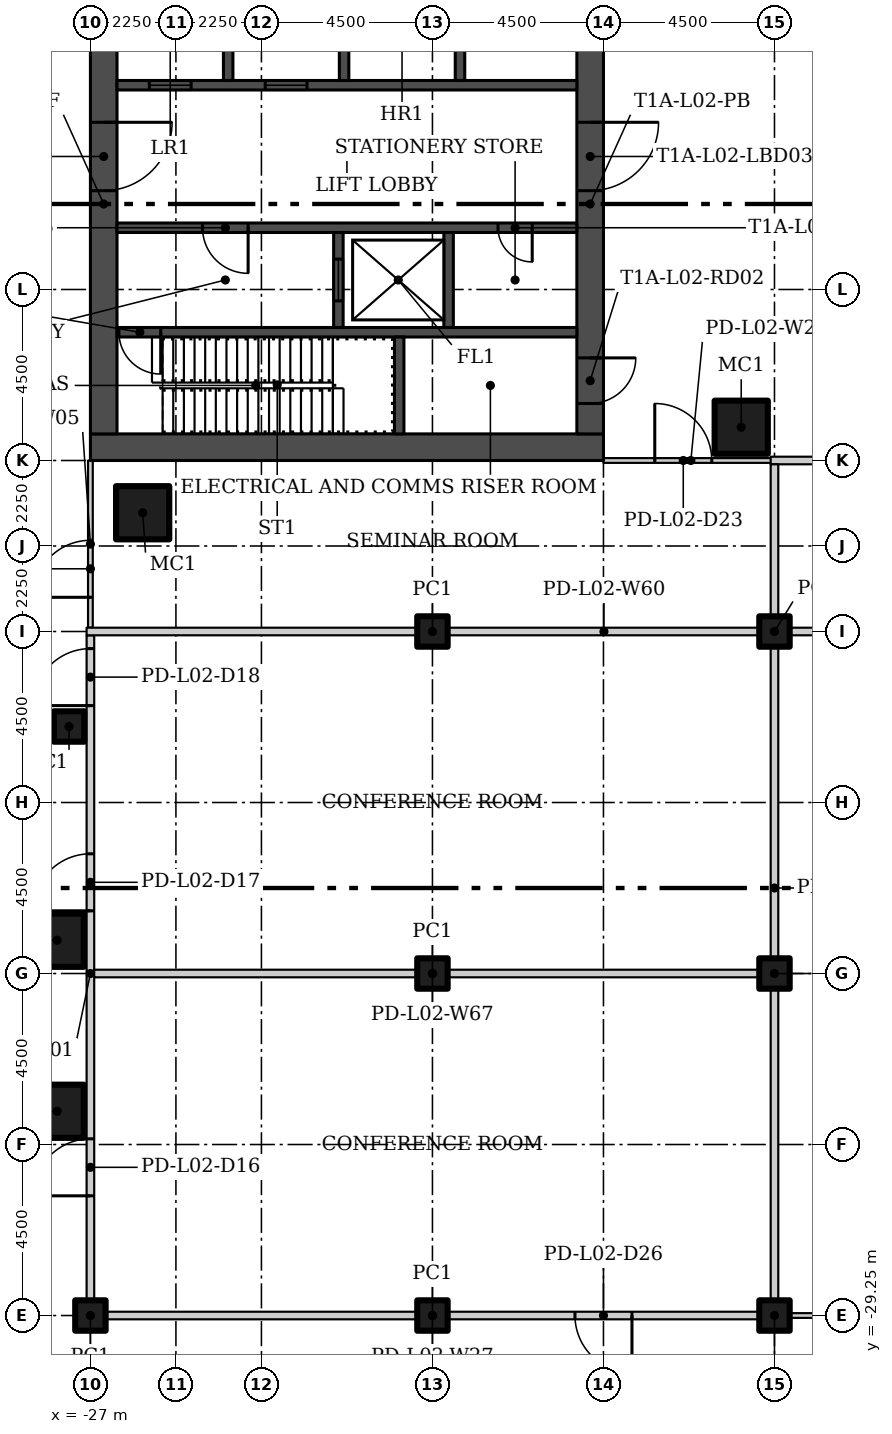
"""IFC4 building model, lengths in metres.
Left out: names, types, materials, properties, quantities, classifications, styles, units other than length and angle.
Written with IfcOpenShell. Run it as: python <this file> out.ifc"""

import sys

from ifc_helpers import new_model, si_unit, direction, frame, frame_2d, origin, origin_2d, place, context, subcontext, project, spatial, rectangle, hollow_rectangle, extrude, element, fill, save


model = new_model("IFC4")
c1 = context("Model", 3, precision=1e-05, world=origin(), true_north=direction((0.0, 1.0)))
c2 = subcontext(c1, "Body", "Model", "MODEL_VIEW")
j1 = project(units=[si_unit("LENGTHUNIT", "METRE"), si_unit("PLANEANGLEUNIT", "RADIAN")], contexts=[c1])
p1 = place(None, origin())
s1 = spatial("IfcSite", under=j1, at=p1, CompositionType="ELEMENT")
p2 = place(p1, origin())
s2 = spatial("IfcBuilding", under=s1, at=p2, CompositionType="ELEMENT")
p3 = place(p2, frame((0.0, 0.0, 12.5)))
s3 = spatial("IfcBuildingStorey", under=s2, at=p3, CompositionType="ELEMENT", Elevation=12.5)
for number, where in (
    (1, (-25.625, -8.125, 0.0)),
    (2, (-9.875, -5.875, 0.0)),
):
    element("IfcColumn", number, at=place(p3, frame(where)), inside=s3, PredefinedType="COLUMN", context=c2, shape_type="SweptSolid", body=[
        extrude(hollow_rectangle(XDim=1.4, YDim=1.4, WallThickness=0.06, at=origin_2d()), origin(), (0.0, 0.0, 1.0), 5.6),
    ])
p4 = place(p3, frame((-27.562, -13.75, 0.0)))
e3 = element("IfcColumn", 3, at=p4, inside=s3, PredefinedType="COLUMN", context=c2, shape_type="SweptSolid", body=[
    extrude(hollow_rectangle(XDim=0.8, YDim=0.8, WallThickness=0.03, at=origin_2d()), origin(), (0.0, 0.0, 1.0), 5.6),
])
for number, where in (
    (4, (-27.875, -19.375, 0.0)),
    (5, (-27.875, -23.875, 0.0)),
):
    element("IfcColumn", number, at=place(p3, frame(where)), inside=s3, PredefinedType="COLUMN", context=c2, shape_type="SweptSolid", body=[
        extrude(hollow_rectangle(XDim=1.4, YDim=1.4, WallThickness=0.06, at=origin_2d()), origin(), (0.0, 0.0, 1.0), 5.6),
    ])
for number, where in (
    (6, (-27.0, -29.25, 0.0)),
    (7, (-18.0, -29.25, 0.0)),
    (8, (-18.0, -20.25, 0.0)),
    (9, (-18.0, -11.25, 0.0)),
    (10, (-9.0, -29.25, 0.0)),
    (11, (-9.0, -20.25, 0.0)),
    (12, (-9.0, -11.25, 0.0)),
):
    element("IfcColumn", number, at=place(p3, frame(where)), inside=s3, PredefinedType="COLUMN", context=c2, shape_type="SweptSolid", body=[
        extrude(hollow_rectangle(XDim=0.8, YDim=0.8, WallThickness=0.03, at=origin_2d()), origin(), (0.0, 0.0, 1.0), 5.6),
    ])
p5 = place(p3, frame((-27.0, -29.15, 0.0), z_axis=(0.0, 0.0, 1.0), x_axis=(0.0, 1.0, 0.0)))
e13 = element("IfcWall", 13, at=p5, inside=s3, PredefinedType="PARTITIONING", context=c2, shape_type="SweptSolid", body=[
    extrude(rectangle(XDim=17.8, YDim=0.2, at=frame_2d((8.9, 0.0))), origin(), (0.0, 0.0, 1.0), 5.6),
])
p6 = place(p5, frame((3.05, 0.0, 0.0)))
e14 = element("IfcOpeningElement", 14, at=p6, cuts=e13, PredefinedType="OPENING", context=c2, shape_type="SweptSolid", body=[
    extrude(rectangle(XDim=1.5, YDim=2.1, at=frame_2d((0.75, 1.05))), frame((0.0, 0.11, 0.0), z_axis=(0.0, -1.0, 0.0), x_axis=(1.0, 0.0, 0.0)), (0.0, 0.0, 1.0), 0.22),
])
p7 = place(p5, frame((10.55, 0.0, 0.0)))
e15 = element("IfcOpeningElement", 15, at=p7, cuts=e13, PredefinedType="OPENING", context=c2, shape_type="SweptSolid", body=[
    extrude(rectangle(XDim=1.5, YDim=2.1, at=frame_2d((0.75, 1.05))), frame((0.0, 0.11, 0.0), z_axis=(0.0, -1.0, 0.0), x_axis=(1.0, 0.0, 0.0)), (0.0, 0.0, 1.0), 0.22),
])
p8 = place(p5, frame((15.95, 0.0, 0.0)))
e16 = element("IfcOpeningElement", 16, at=p8, cuts=e13, PredefinedType="OPENING", context=c2, shape_type="SweptSolid", body=[
    extrude(rectangle(XDim=1.5, YDim=2.1, at=frame_2d((0.75, 1.05))), frame((0.0, 0.11, 0.0), z_axis=(0.0, -1.0, 0.0), x_axis=(1.0, 0.0, 0.0)), (0.0, 0.0, 1.0), 0.22),
])
p9 = place(p3, frame((-27.0, -11.15, 0.0), z_axis=(0.0, 0.0, 1.0), x_axis=(0.0, 1.0, 0.0)))
e17 = element("IfcWall", 17, at=p9, inside=s3, PredefinedType="PARTITIONING", context=c2, shape_type="SweptSolid", body=[
    extrude(rectangle(XDim=4.4, YDim=0.125, at=frame_2d((2.2, 0.0))), origin(), (0.0, 0.0, 1.0), 5.6),
])
p10 = place(p9, frame((0.8, 0.0, 0.0)))
e18 = element("IfcOpeningElement", 18, at=p10, cuts=e17, PredefinedType="OPENING", context=c2, shape_type="SweptSolid", body=[
    extrude(rectangle(XDim=1.5, YDim=2.1, at=frame_2d((0.75, 1.05))), frame((0.0, 0.073, 0.0), z_axis=(0.0, -1.0, 0.0), x_axis=(1.0, 0.0, 0.0)), (0.0, 0.0, 1.0), 0.145),
])
p11 = place(p3, frame((-13.5, -6.75, 0.0)))
e19 = element("IfcWall", 19, at=p11, inside=s3, PredefinedType="PARTITIONING", context=c2, shape_type="SweptSolid", body=[
    extrude(rectangle(XDim=4.6, YDim=0.125, at=frame_2d((2.3, 0.0))), origin(), (0.0, 0.0, 1.0), 5.6),
])
p12 = place(p11, frame((1.35, 0.0, 0.0)))
e20 = element("IfcOpeningElement", 20, at=p12, cuts=e19, PredefinedType="OPENING", context=c2, shape_type="SweptSolid", body=[
    extrude(rectangle(XDim=1.5, YDim=2.1, at=frame_2d((0.75, 1.05))), frame((0.0, 0.073, 0.0), z_axis=(0.0, -1.0, 0.0), x_axis=(1.0, 0.0, 0.0)), (0.0, 0.0, 1.0), 0.145),
])
p13 = place(p3, frame((0.1, -6.75, 0.0), z_axis=(0.0, 0.0, 1.0), x_axis=(-1.0, 0.0, 0.0)))
e21 = element("IfcWall", 21, at=p13, inside=s3, PredefinedType="PARTITIONING", context=c2, shape_type="SweptSolid", body=[
    extrude(rectangle(XDim=9.2, YDim=0.2, at=frame_2d((4.6, 0.0))), origin(), (0.0, 0.0, 1.0), 5.6),
])
p14 = place(p13, frame((3.25, 0.0, 0.0)))
e22 = element("IfcOpeningElement", 22, at=p14, cuts=e21, PredefinedType="OPENING", context=c2, shape_type="SweptSolid", body=[
    extrude(rectangle(XDim=1.5, YDim=2.1, at=frame_2d((0.75, 1.05))), frame((0.0, 0.11, 0.0), z_axis=(0.0, -1.0, 0.0), x_axis=(1.0, 0.0, 0.0)), (0.0, 0.0, 1.0), 0.22),
])
p15 = place(p3, frame((-8.9, -29.25, 0.0), z_axis=(0.0, 0.0, 1.0), x_axis=(-1.0, 0.0, 0.0)))
e23 = element("IfcWall", 23, at=p15, inside=s3, PredefinedType="PARTITIONING", context=c2, shape_type="SweptSolid", body=[
    extrude(rectangle(XDim=18.2, YDim=0.2, at=frame_2d((9.1, 0.0))), origin(), (0.0, 0.0, 1.0), 5.6),
])
p16 = place(p15, frame((3.85, 0.0, 0.0)))
e24 = element("IfcOpeningElement", 24, at=p16, cuts=e23, PredefinedType="OPENING", context=c2, shape_type="SweptSolid", body=[
    extrude(rectangle(XDim=1.5, YDim=2.1, at=frame_2d((0.75, 1.05))), frame((0.0, 0.11, 0.0), z_axis=(0.0, -1.0, 0.0), x_axis=(1.0, 0.0, 0.0)), (0.0, 0.0, 1.0), 0.22),
])
p17 = place(p3, frame((0.125, -29.25, 0.0), z_axis=(0.0, 0.0, 1.0), x_axis=(-1.0, 0.0, 0.0)))
e25 = element("IfcWall", 25, at=p17, inside=s3, PredefinedType="PARTITIONING", context=c2, shape_type="SweptSolid", body=[
    extrude(rectangle(XDim=9.225, YDim=0.125, at=frame_2d((4.613, 0.0))), origin(), (0.0, 0.0, 1.0), 5.6),
])
p18 = place(p17, frame((1.175, 0.0, 0.0)))
e26 = element("IfcOpeningElement", 26, at=p18, cuts=e25, PredefinedType="OPENING", context=c2, shape_type="SweptSolid", body=[
    extrude(rectangle(XDim=1.5, YDim=2.1, at=frame_2d((0.75, 1.05))), frame((0.0, 0.073, 0.0), z_axis=(0.0, -1.0, 0.0), x_axis=(1.0, 0.0, 0.0)), (0.0, 0.0, 1.0), 0.145),
])
p19 = place(p17, frame((6.575, 0.0, 0.0)))
e27 = element("IfcOpeningElement", 27, at=p19, cuts=e25, PredefinedType="OPENING", context=c2, shape_type="SweptSolid", body=[
    extrude(rectangle(XDim=1.5, YDim=2.1, at=frame_2d((0.75, 1.05))), frame((0.0, 0.073, 0.0), z_axis=(0.0, -1.0, 0.0), x_axis=(1.0, 0.0, 0.0)), (0.0, 0.0, 1.0), 0.145),
])
p20 = place(p3, frame((0.125, -11.25, 0.0), z_axis=(0.0, 0.0, 1.0), x_axis=(-1.0, 0.0, 0.0)))
e28 = element("IfcWall", 28, at=p20, inside=s3, PredefinedType="PARTITIONING", context=c2, shape_type="SweptSolid", body=[
    extrude(rectangle(XDim=27.225, YDim=0.2, at=frame_2d((13.613, 0.0))), origin(), (0.0, 0.0, 1.0), 5.6),
])
p21 = place(p3, frame((-9.1, -20.25, 0.0), z_axis=(0.0, 0.0, 1.0), x_axis=(-1.0, 0.0, 0.0)))
e29 = element("IfcWall", 29, at=p21, inside=s3, PredefinedType="PARTITIONING", context=c2, shape_type="SweptSolid", body=[
    extrude(rectangle(XDim=17.8, YDim=0.2, at=frame_2d((8.9, 0.0))), origin(), (0.0, 0.0, 1.0), 5.6),
])
p22 = place(p3, frame((-9.0, -29.15, 0.0), z_axis=(0.0, 0.0, 1.0), x_axis=(0.0, 1.0, 0.0)))
e30 = element("IfcWall", 30, at=p22, inside=s3, PredefinedType="PARTITIONING", context=c2, shape_type="SweptSolid", body=[
    extrude(rectangle(XDim=22.3, YDim=0.2, at=frame_2d((11.15, 0.0))), origin(), (0.0, 0.0, 1.0), 5.6),
])
p23 = place(p3, frame((-27.0, -6.4, 0.0)))
e31 = element("IfcWall", 31, at=p23, inside=s3, PredefinedType="SHEAR", context=c2, shape_type="SweptSolid", body=[
    extrude(rectangle(XDim=13.5, YDim=0.7, at=frame_2d((6.75, 0.0))), origin(), (0.0, 0.0, 1.0), 5.6),
])
p24 = place(p3, frame((-26.65, 6.05, 0.0), z_axis=(0.0, 0.0, 1.0), x_axis=(0.0, -1.0, 0.0)))
e32 = element("IfcWall", 32, at=p24, inside=s3, PredefinedType="SHEAR", context=c2, shape_type="SweptSolid", body=[
    extrude(rectangle(XDim=12.1, YDim=0.7, at=frame_2d((6.05, 0.0))), origin(), (0.0, 0.0, 1.0), 5.6),
])
p25 = place(p24, frame((3.9, 0.0, 0.0)))
e33 = element("IfcOpeningElement", 33, at=p25, cuts=e32, PredefinedType="OPENING", context=c2, shape_type="SweptSolid", body=[
    extrude(rectangle(XDim=1.8, YDim=2.4, at=frame_2d((0.9, 1.2))), frame((0.0, 0.36, 0.0), z_axis=(0.0, -1.0, 0.0), x_axis=(1.0, 0.0, 0.0)), (0.0, 0.0, 1.0), 0.72),
])
p26 = place(p3, frame((-13.85, 6.05, 0.0), z_axis=(0.0, 0.0, 1.0), x_axis=(0.0, -1.0, 0.0)))
e34 = element("IfcWall", 34, at=p26, inside=s3, PredefinedType="SHEAR", context=c2, shape_type="SweptSolid", body=[
    extrude(rectangle(XDim=12.1, YDim=0.7, at=frame_2d((6.05, 0.0))), origin(), (0.0, 0.0, 1.0), 5.6),
])
p27 = place(p26, frame((10.1, 0.0, 0.0)))
e35 = element("IfcOpeningElement", 35, at=p27, cuts=e34, PredefinedType="OPENING", context=c2, shape_type="SweptSolid", body=[
    extrude(rectangle(XDim=1.2, YDim=2.1, at=frame_2d((0.6, 1.05))), frame((0.0, 0.36, 0.0), z_axis=(0.0, -1.0, 0.0), x_axis=(1.0, 0.0, 0.0)), (0.0, 0.0, 1.0), 0.72),
])
p28 = place(p26, frame((3.9, 0.0, 0.0)))
e36 = element("IfcOpeningElement", 36, at=p28, cuts=e34, PredefinedType="OPENING", context=c2, shape_type="SweptSolid", body=[
    extrude(rectangle(XDim=1.8, YDim=2.4, at=frame_2d((0.9, 1.2))), frame((0.0, 0.36, 0.0), z_axis=(0.0, -1.0, 0.0), x_axis=(1.0, 0.0, 0.0)), (0.0, 0.0, 1.0), 0.72),
])
p29 = place(p3, frame((-14.2, -3.375, 0.0), z_axis=(0.0, 0.0, 1.0), x_axis=(-1.0, 0.0, 0.0)))
e37 = element("IfcWall", 37, at=p29, inside=s3, PredefinedType="SHEAR", context=c2, shape_type="SweptSolid", body=[
    extrude(rectangle(XDim=12.1, YDim=0.25, at=frame_2d((6.05, 0.0))), origin(), (0.0, 0.0, 1.0), 5.6),
])
p30 = place(p29, frame((10.95, 0.0, 0.0)))
e38 = element("IfcOpeningElement", 38, at=p30, cuts=e37, PredefinedType="OPENING", context=c2, shape_type="SweptSolid", body=[
    extrude(rectangle(XDim=1.1, YDim=2.1, at=frame_2d((0.55, 1.05))), frame((0.0, 0.135, 0.0), z_axis=(0.0, -1.0, 0.0), x_axis=(1.0, 0.0, 0.0)), (0.0, 0.0, 1.0), 0.27),
])
p31 = place(p3, frame((-18.875, -6.05, 0.0), z_axis=(0.0, 0.0, 1.0), x_axis=(0.0, 1.0, 0.0)))
e39 = element("IfcWall", 39, at=p31, inside=s3, PredefinedType="SHEAR", context=c2, shape_type="SweptSolid", body=[
    extrude(rectangle(XDim=2.55, YDim=0.25, at=frame_2d((1.275, 0.0))), origin(), (0.0, 0.0, 1.0), 5.6),
])
p32 = place(p3, frame((-14.2, -0.625, 0.0), z_axis=(0.0, 0.0, 1.0), x_axis=(-1.0, 0.0, 0.0)))
e40 = element("IfcWall", 40, at=p32, inside=s3, PredefinedType="SHEAR", context=c2, shape_type="SweptSolid", body=[
    extrude(rectangle(XDim=12.1, YDim=0.25, at=frame_2d((6.05, 0.0))), origin(), (0.0, 0.0, 1.0), 5.6),
])
p33 = place(p32, frame((8.65, 0.0, 0.0)))
e41 = element("IfcOpeningElement", 41, at=p33, cuts=e40, PredefinedType="OPENING", context=c2, shape_type="SweptSolid", body=[
    extrude(rectangle(XDim=1.2, YDim=2.1, at=frame_2d((0.6, 1.05))), frame((0.0, 0.135, 0.0), z_axis=(0.0, -1.0, 0.0), x_axis=(1.0, 0.0, 0.0)), (0.0, 0.0, 1.0), 0.27),
])
p34 = place(p32, frame((1.175, 0.0, 0.0)))
e42 = element("IfcOpeningElement", 42, at=p34, cuts=e40, PredefinedType="OPENING", context=c2, shape_type="SweptSolid", body=[
    extrude(rectangle(XDim=0.9, YDim=2.1, at=frame_2d((0.45, 1.05))), frame((0.0, 0.135, 0.0), z_axis=(0.0, -1.0, 0.0), x_axis=(1.0, 0.0, 0.0)), (0.0, 0.0, 1.0), 0.27),
])
p35 = place(p3, frame((-20.475, -3.25, 0.0), z_axis=(0.0, 0.0, 1.0), x_axis=(0.0, 1.0, 0.0)))
e43 = element("IfcWall", 43, at=p35, inside=s3, PredefinedType="SHEAR", context=c2, shape_type="SweptSolid", body=[
    extrude(rectangle(XDim=2.5, YDim=0.25, at=frame_2d((1.25, 0.0))), origin(), (0.0, 0.0, 1.0), 5.6),
])
p36 = place(p35, frame((0.7, 0.0, 0.0)))
e44 = element("IfcOpeningElement", 44, at=p36, cuts=e43, PredefinedType="OPENING", context=c2, shape_type="SweptSolid", body=[
    extrude(rectangle(XDim=1.1, YDim=2.1, at=frame_2d((0.55, 1.05))), frame((0.0, 0.135, 0.0), z_axis=(0.0, -1.0, 0.0), x_axis=(1.0, 0.0, 0.0)), (0.0, 0.0, 1.0), 0.27),
])
p37 = place(p3, frame((-17.575, -3.25, 0.0), z_axis=(0.0, 0.0, 1.0), x_axis=(0.0, 1.0, 0.0)))
e45 = element("IfcWall", 45, at=p37, inside=s3, PredefinedType="SHEAR", context=c2, shape_type="SweptSolid", body=[
    extrude(rectangle(XDim=2.5, YDim=0.25, at=frame_2d((1.25, 0.0))), origin(), (0.0, 0.0, 1.0), 5.6),
])
p38 = place(p3, frame((-26.3, 3.125, 0.0)))
e46 = element("IfcWall", 46, at=p38, inside=s3, PredefinedType="SHEAR", context=c2, shape_type="SweptSolid", body=[
    extrude(rectangle(XDim=12.1, YDim=0.25, at=frame_2d((6.05, 0.0))), origin(), (0.0, 0.0, 1.0), 5.6),
])
p39 = place(p38, frame((0.85, 0.0, 0.0)))
e47 = element("IfcOpeningElement", 47, at=p39, cuts=e46, PredefinedType="OPENING", context=c2, shape_type="SweptSolid", body=[
    extrude(rectangle(XDim=1.1, YDim=2.1, at=frame_2d((0.55, 1.05))), frame((0.0, 0.135, 0.0), z_axis=(0.0, -1.0, 0.0), x_axis=(1.0, 0.0, 0.0)), (0.0, 0.0, 1.0), 0.27),
])
p40 = place(p38, frame((3.9, 0.0, 0.0)))
e48 = element("IfcOpeningElement", 48, at=p40, cuts=e46, PredefinedType="OPENING", context=c2, shape_type="SweptSolid", body=[
    extrude(rectangle(XDim=1.1, YDim=2.1, at=frame_2d((0.55, 1.05))), frame((0.0, 0.135, 0.0), z_axis=(0.0, -1.0, 0.0), x_axis=(1.0, 0.0, 0.0)), (0.0, 0.0, 1.0), 0.27),
])
for number, where, z_axis, x_axis in (
    (49, (-23.375, 3.25, 0.0), (0.0, 0.0, 1.0), (0.0, 1.0, 0.0)),
    (50, (-20.325, 3.25, 0.0), (0.0, 0.0, 1.0), (0.0, 1.0, 0.0)),
    (51, (-17.275, 3.25, 0.0), (0.0, 0.0, 1.0), (0.0, 1.0, 0.0)),
):
    element("IfcWall", number, at=place(p3, frame(where, z_axis=z_axis, x_axis=x_axis)), inside=s3, PredefinedType="SHEAR", context=c2, shape_type="SweptSolid", body=[
        extrude(rectangle(XDim=2.8, YDim=0.25, at=frame_2d((1.4, 0.0))), origin(), (0.0, 0.0, 1.0), 5.6),
    ])
p41 = place(p6, origin())
e52 = element("IfcDoor", 52, at=p41, inside=s3, OperationType="DOUBLE_DOOR_SINGLE_SWING", PredefinedType="DOOR", context=c2, shape_type="SweptSolid", body=[
    extrude(rectangle(XDim=1.5, YDim=2.1, at=frame_2d((0.75, 1.05))), frame((0.0, 0.025, 0.0), z_axis=(0.0, -1.0, 0.0), x_axis=(1.0, 0.0, 0.0)), (0.0, 0.0, 1.0), 0.05),
])
fill(e14, e52)
p42 = place(p7, origin())
e53 = element("IfcDoor", 53, at=p42, inside=s3, OperationType="DOUBLE_DOOR_SINGLE_SWING", PredefinedType="DOOR", context=c2, shape_type="SweptSolid", body=[
    extrude(rectangle(XDim=1.5, YDim=2.1, at=frame_2d((0.75, 1.05))), frame((0.0, 0.025, 0.0), z_axis=(0.0, -1.0, 0.0), x_axis=(1.0, 0.0, 0.0)), (0.0, 0.0, 1.0), 0.05),
])
fill(e15, e53)
p43 = place(p8, origin())
e54 = element("IfcDoor", 54, at=p43, inside=s3, OperationType="DOUBLE_DOOR_SINGLE_SWING", PredefinedType="DOOR", context=c2, shape_type="SweptSolid", body=[
    extrude(rectangle(XDim=1.5, YDim=2.1, at=frame_2d((0.75, 1.05))), frame((0.0, 0.025, 0.0), z_axis=(0.0, -1.0, 0.0), x_axis=(1.0, 0.0, 0.0)), (0.0, 0.0, 1.0), 0.05),
])
fill(e16, e54)
p44 = place(p10, origin())
e55 = element("IfcDoor", 55, at=p44, inside=s3, OperationType="DOUBLE_DOOR_SINGLE_SWING", PredefinedType="DOOR", context=c2, shape_type="SweptSolid", body=[
    extrude(rectangle(XDim=1.5, YDim=2.1, at=frame_2d((0.75, 1.05))), frame((0.0, 0.025, 0.0), z_axis=(0.0, -1.0, 0.0), x_axis=(1.0, 0.0, 0.0)), (0.0, 0.0, 1.0), 0.05),
])
fill(e18, e55)
p45 = place(p12, origin())
e56 = element("IfcDoor", 56, at=p45, inside=s3, OperationType="DOUBLE_DOOR_SINGLE_SWING", PredefinedType="DOOR", context=c2, shape_type="SweptSolid", body=[
    extrude(rectangle(XDim=1.5, YDim=2.1, at=frame_2d((0.75, 1.05))), frame((0.0, 0.025, 0.0), z_axis=(0.0, -1.0, 0.0), x_axis=(1.0, 0.0, 0.0)), (0.0, 0.0, 1.0), 0.05),
])
fill(e20, e56)
p46 = place(p16, origin())
e57 = element("IfcDoor", 57, at=p46, inside=s3, OperationType="DOUBLE_DOOR_SINGLE_SWING", PredefinedType="DOOR", context=c2, shape_type="SweptSolid", body=[
    extrude(rectangle(XDim=1.5, YDim=2.1, at=frame_2d((0.75, 1.05))), frame((0.0, 0.025, 0.0), z_axis=(0.0, -1.0, 0.0), x_axis=(1.0, 0.0, 0.0)), (0.0, 0.0, 1.0), 0.05),
])
fill(e24, e57)
p47 = place(p25, origin())
e58 = element("IfcDoor", 58, at=p47, inside=s3, OperationType="DOUBLE_DOOR_SINGLE_SWING", PredefinedType="DOOR", context=c2, shape_type="SweptSolid", body=[
    extrude(rectangle(XDim=1.8, YDim=2.4, at=frame_2d((0.9, 1.2))), frame((0.0, 0.025, 0.0), z_axis=(0.0, -1.0, 0.0), x_axis=(1.0, 0.0, 0.0)), (0.0, 0.0, 1.0), 0.05),
])
fill(e33, e58)
p48 = place(p27, origin())
e59 = element("IfcDoor", 59, at=p48, inside=s3, OperationType="SINGLE_SWING_RIGHT", PredefinedType="DOOR", context=c2, shape_type="SweptSolid", body=[
    extrude(rectangle(XDim=1.2, YDim=2.1, at=frame_2d((0.6, 1.05))), frame((0.0, 0.025, 0.0), z_axis=(0.0, -1.0, 0.0), x_axis=(1.0, 0.0, 0.0)), (0.0, 0.0, 1.0), 0.05),
])
fill(e35, e59)
p49 = place(p28, origin())
e60 = element("IfcDoor", 60, at=p49, inside=s3, OperationType="DOUBLE_DOOR_SINGLE_SWING", PredefinedType="DOOR", context=c2, shape_type="SweptSolid", body=[
    extrude(rectangle(XDim=1.8, YDim=2.4, at=frame_2d((0.9, 1.2))), frame((0.0, 0.025, 0.0), z_axis=(0.0, -1.0, 0.0), x_axis=(1.0, 0.0, 0.0)), (0.0, 0.0, 1.0), 0.05),
])
fill(e36, e60)
p50 = place(p30, origin())
e61 = element("IfcDoor", 61, at=p50, inside=s3, OperationType="SINGLE_SWING_RIGHT", PredefinedType="DOOR", context=c2, shape_type="SweptSolid", body=[
    extrude(rectangle(XDim=1.1, YDim=2.1, at=frame_2d((0.55, 1.05))), frame((0.0, 0.025, 0.0), z_axis=(0.0, -1.0, 0.0), x_axis=(1.0, 0.0, 0.0)), (0.0, 0.0, 1.0), 0.05),
])
fill(e38, e61)
p51 = place(p33, origin())
e62 = element("IfcDoor", 62, at=p51, inside=s3, OperationType="SINGLE_SWING_RIGHT", PredefinedType="DOOR", context=c2, shape_type="SweptSolid", body=[
    extrude(rectangle(XDim=1.2, YDim=2.1, at=frame_2d((0.6, 1.05))), frame((0.0, 0.025, 0.0), z_axis=(0.0, -1.0, 0.0), x_axis=(1.0, 0.0, 0.0)), (0.0, 0.0, 1.0), 0.05),
])
fill(e41, e62)
p52 = place(p34, origin())
e63 = element("IfcDoor", 63, at=p52, inside=s3, OperationType="SINGLE_SWING_LEFT", PredefinedType="DOOR", context=c2, shape_type="SweptSolid", body=[
    extrude(rectangle(XDim=0.9, YDim=2.1, at=frame_2d((0.45, 1.05))), frame((0.0, 0.025, 0.0), z_axis=(0.0, -1.0, 0.0), x_axis=(1.0, 0.0, 0.0)), (0.0, 0.0, 1.0), 0.05),
])
fill(e42, e63)
p53 = place(p36, origin())
e64 = element("IfcDoor", 64, at=p53, inside=s3, OperationType="SLIDING_TO_LEFT", PredefinedType="DOOR", context=c2, shape_type="SweptSolid", body=[
    extrude(rectangle(XDim=1.1, YDim=2.1, at=frame_2d((0.55, 1.05))), frame((0.0, 0.025, 0.0), z_axis=(0.0, -1.0, 0.0), x_axis=(1.0, 0.0, 0.0)), (0.0, 0.0, 1.0), 0.05),
])
fill(e44, e64)
p54 = place(p39, origin())
e65 = element("IfcDoor", 65, at=p54, inside=s3, OperationType="SLIDING_TO_LEFT", PredefinedType="DOOR", context=c2, shape_type="SweptSolid", body=[
    extrude(rectangle(XDim=1.1, YDim=2.1, at=frame_2d((0.55, 1.05))), frame((0.0, 0.025, 0.0), z_axis=(0.0, -1.0, 0.0), x_axis=(1.0, 0.0, 0.0)), (0.0, 0.0, 1.0), 0.05),
])
fill(e47, e65)
p55 = place(p40, origin())
e66 = element("IfcDoor", 66, at=p55, inside=s3, OperationType="SLIDING_TO_LEFT", PredefinedType="DOOR", context=c2, shape_type="SweptSolid", body=[
    extrude(rectangle(XDim=1.1, YDim=2.1, at=frame_2d((0.55, 1.05))), frame((0.0, 0.025, 0.0), z_axis=(0.0, -1.0, 0.0), x_axis=(1.0, 0.0, 0.0)), (0.0, 0.0, 1.0), 0.05),
])
fill(e48, e66)
save(model, sys.argv[1])
